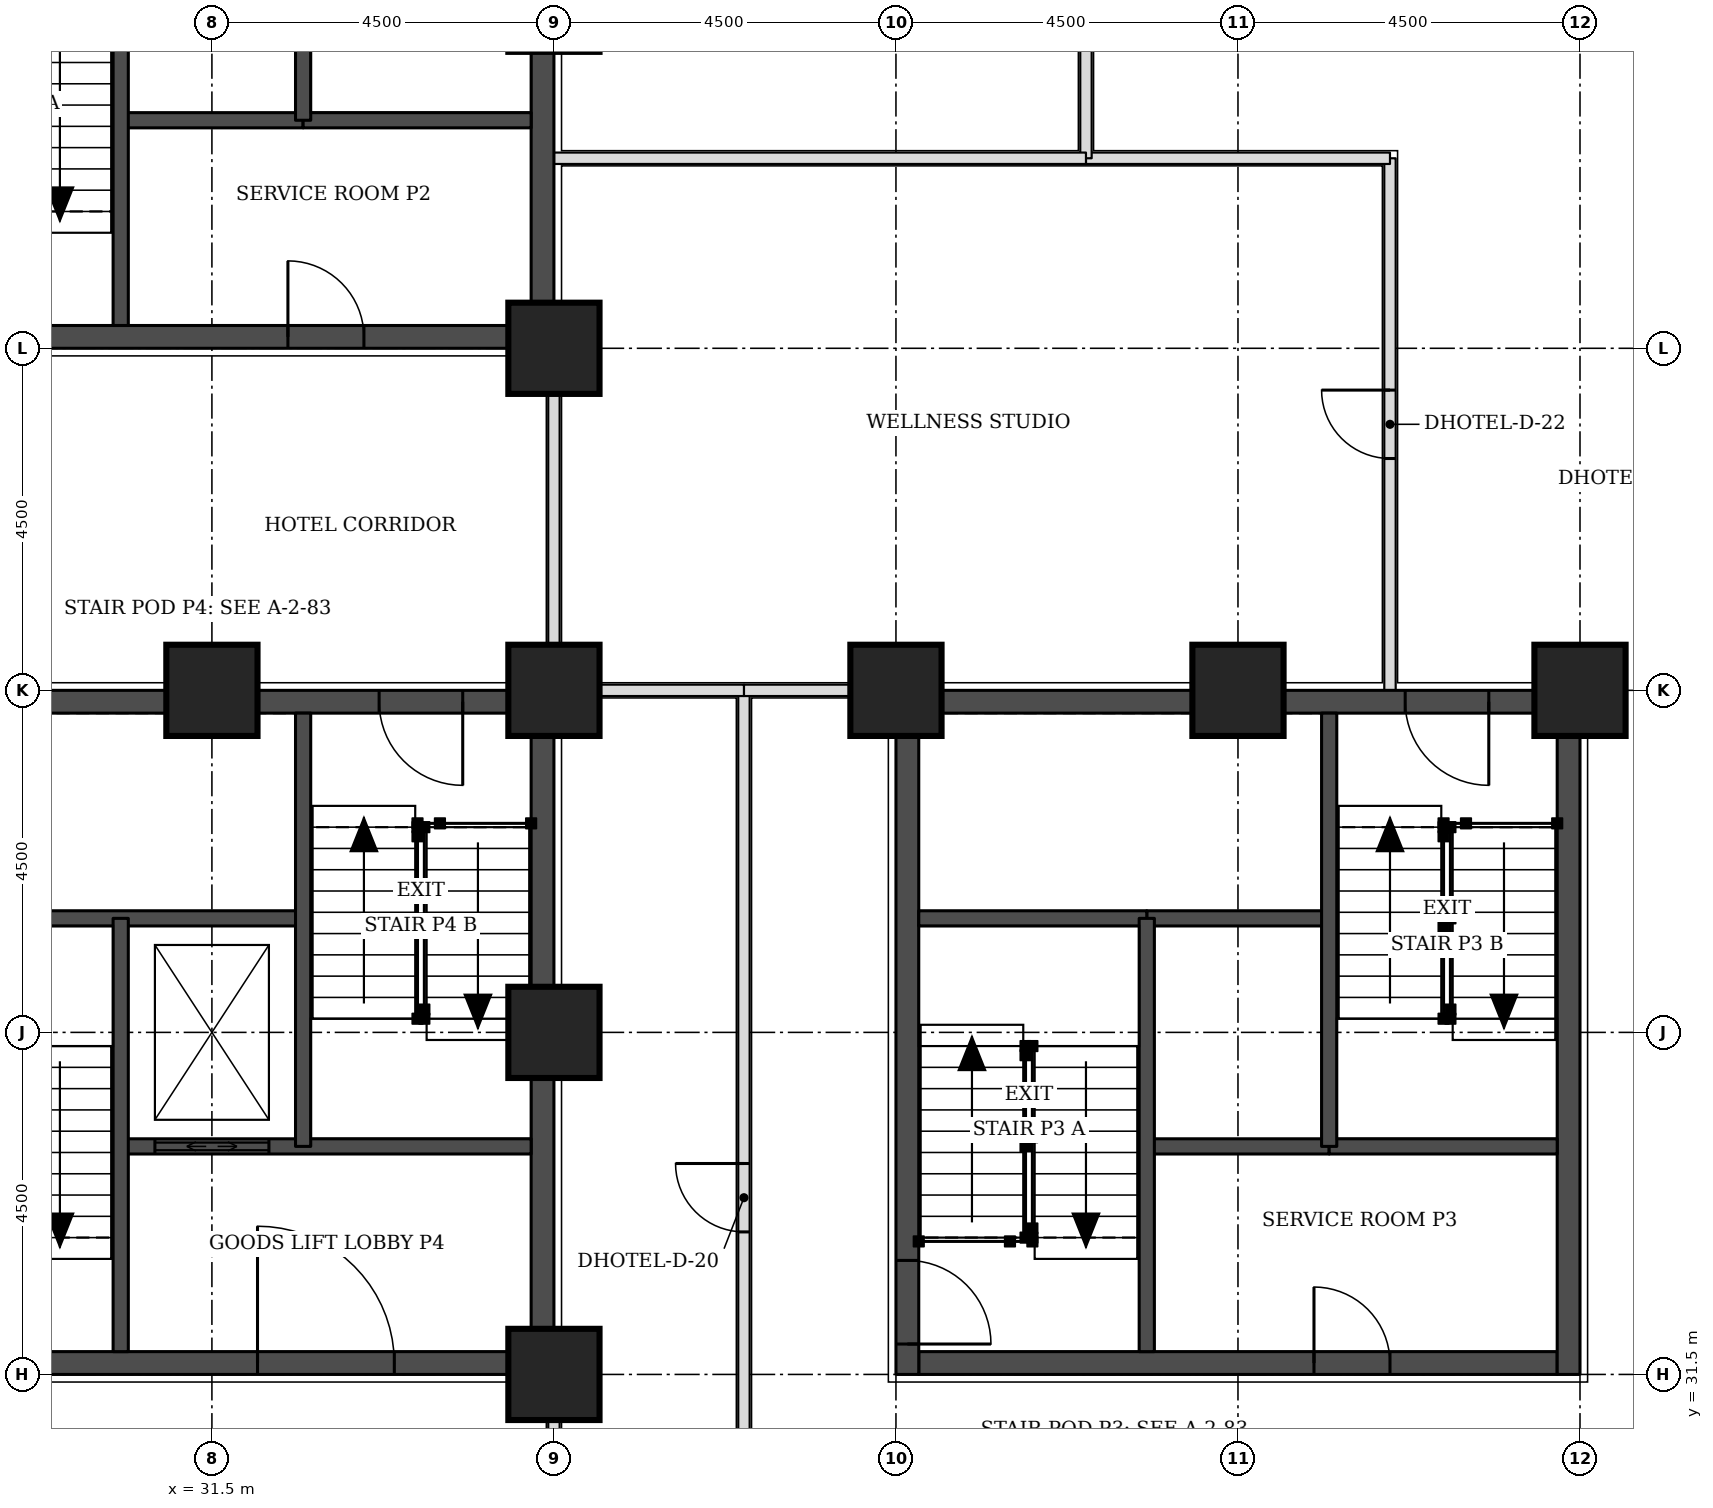
"""IFC4 building model, lengths in metres.
Left out: names, types, materials, properties, quantities, classifications, styles, units other than length and angle.
Written with IfcOpenShell. Run it as: python <this file> out.ifc"""

import sys

from ifc_helpers import new_model, si_unit, direction, frame, frame_2d, origin, origin_2d, place, context, subcontext, project, spatial, rectangle, extrude, element, fill, save


model = new_model("IFC4")
c1 = context("Model", 3, precision=1e-05, world=origin(), true_north=direction((0.0, 1.0)))
c2 = subcontext(c1, "Body", "Model", "MODEL_VIEW")
j1 = project(units=[si_unit("LENGTHUNIT", "METRE"), si_unit("PLANEANGLEUNIT", "RADIAN")], contexts=[c1])
p1 = place(None, origin())
s1 = spatial("IfcSite", under=j1, at=p1, CompositionType="ELEMENT")
p2 = place(p1, origin())
s2 = spatial("IfcBuilding", under=s1, at=p2, CompositionType="ELEMENT")
p3 = place(p2, frame((0.0, 0.0, 59.4)))
s3 = spatial("IfcBuildingStorey", under=s2, at=p3, CompositionType="ELEMENT", Elevation=59.4)
for number, where, z_axis, x_axis in (
    (1, (36.0, 31.5, 0.0), (0.0, 0.0, 1.0), (1.0, 0.0, 0.0)),
    (2, (36.0, 36.0, 0.0), (0.0, 0.0, 1.0), (1.0, 0.0, 0.0)),
    (3, (31.5, 40.5, 0.0), (0.0, 0.0, 1.0), (1.0, 0.0, 0.0)),
    (4, (36.0, 40.5, 0.0), (0.0, 0.0, 1.0), (1.0, 0.0, 0.0)),
    (5, (40.5, 40.5, 0.0), (0.0, 0.0, 1.0), (1.0, 0.0, 0.0)),
    (6, (45.0, 40.5, 0.0), (0.0, 0.0, 1.0), (1.0, 0.0, 0.0)),
    (7, (49.5, 40.5, 0.0), (0.0, 0.0, 1.0), (1.0, 0.0, 0.0)),
    (8, (36.0, 45.0, 0.0), (0.0, 0.0, 1.0), (1.0, 0.0, 0.0)),
):
    element("IfcColumn", number, at=place(p3, frame(where, z_axis=z_axis, x_axis=x_axis)), inside=s3, PredefinedType="COLUMN", context=c2, shape_type="SweptSolid", body=[
        extrude(rectangle(XDim=1.2, YDim=1.2, at=origin_2d()), origin(), (0.0, 0.0, 1.0), 3.3),
    ])
p4 = place(p3, frame((27.3, 45.15, 0.0), z_axis=(0.0, 0.0, 1.0), x_axis=(1.0, 0.0, 0.0)))
e9 = element("IfcWall", 9, at=p4, inside=s3, PredefinedType="SHEAR", context=c2, shape_type="SweptSolid", body=[
    extrude(rectangle(XDim=8.4, YDim=0.3, at=frame_2d((4.2, 0.0))), origin(), (0.0, 0.0, 1.0), 3.3),
])
p5 = place(p4, frame((5.2, 0.0, 0.0)))
e10 = element("IfcOpeningElement", 10, at=p5, cuts=e9, PredefinedType="OPENING", context=c2, shape_type="SweptSolid", body=[
    extrude(rectangle(XDim=1.0, YDim=2.1, at=frame_2d((0.5, 1.05))), frame((0.0, 0.16, 0.0), z_axis=(0.0, -1.0, 0.0), x_axis=(1.0, 0.0, 0.0)), (0.0, 0.0, 1.0), 0.32),
])
p6 = place(p3, frame((35.85, 45.0, 0.0), z_axis=(0.0, 0.0, 1.0), x_axis=(0.0, 1.0, 0.0)))
e11 = element("IfcWall", 11, at=p6, inside=s3, PredefinedType="SHEAR", context=c2, shape_type="SweptSolid", body=[
    extrude(rectangle(XDim=9.0, YDim=0.3, at=frame_2d((4.5, 0.0))), origin(), (0.0, 0.0, 1.0), 3.3),
])
p7 = place(p3, frame((40.8, 31.65, 0.0), z_axis=(0.0, 0.0, 1.0), x_axis=(1.0, 0.0, 0.0)))
e12 = element("IfcWall", 12, at=p7, inside=s3, PredefinedType="SHEAR", context=c2, shape_type="SweptSolid", body=[
    extrude(rectangle(XDim=8.4, YDim=0.3, at=frame_2d((4.2, 0.0))), origin(), (0.0, 0.0, 1.0), 3.3),
])
p8 = place(p7, frame((5.2, 0.0, 0.0)))
e13 = element("IfcOpeningElement", 13, at=p8, cuts=e12, PredefinedType="OPENING", context=c2, shape_type="SweptSolid", body=[
    extrude(rectangle(XDim=1.0, YDim=2.1, at=frame_2d((0.5, 1.05))), frame((0.0, 0.16, 0.0), z_axis=(0.0, -1.0, 0.0), x_axis=(1.0, 0.0, 0.0)), (0.0, 0.0, 1.0), 0.32),
])
p9 = place(p3, frame((40.8, 40.35, 0.0), z_axis=(0.0, 0.0, 1.0), x_axis=(1.0, 0.0, 0.0)))
e14 = element("IfcWall", 14, at=p9, inside=s3, PredefinedType="SHEAR", context=c2, shape_type="SweptSolid", body=[
    extrude(rectangle(XDim=8.4, YDim=0.3, at=frame_2d((4.2, 0.0))), origin(), (0.0, 0.0, 1.0), 3.3),
])
p10 = place(p9, frame((6.4, 0.0, 0.0)))
e15 = element("IfcOpeningElement", 15, at=p10, cuts=e14, PredefinedType="OPENING", context=c2, shape_type="SweptSolid", body=[
    extrude(rectangle(XDim=1.1, YDim=2.1, at=frame_2d((0.55, 1.05))), frame((0.0, 0.16, 0.0), z_axis=(0.0, -1.0, 0.0), x_axis=(1.0, 0.0, 0.0)), (0.0, 0.0, 1.0), 0.32),
])
p11 = place(p3, frame((40.65, 31.5, 0.0), z_axis=(0.0, 0.0, 1.0), x_axis=(0.0, 1.0, 0.0)))
e16 = element("IfcWall", 16, at=p11, inside=s3, PredefinedType="SHEAR", context=c2, shape_type="SweptSolid", body=[
    extrude(rectangle(XDim=9.0, YDim=0.3, at=frame_2d((4.5, 0.0))), origin(), (0.0, 0.0, 1.0), 3.3),
])
p12 = place(p11, frame((0.4, 0.0, 0.0)))
e17 = element("IfcOpeningElement", 17, at=p12, cuts=e16, PredefinedType="OPENING", context=c2, shape_type="SweptSolid", body=[
    extrude(rectangle(XDim=1.1, YDim=2.1, at=frame_2d((0.55, 1.05))), frame((0.0, 0.16, 0.0), z_axis=(0.0, -1.0, 0.0), x_axis=(1.0, 0.0, 0.0)), (0.0, 0.0, 1.0), 0.32),
])
p13 = place(p3, frame((49.35, 31.5, 0.0), z_axis=(0.0, 0.0, 1.0), x_axis=(0.0, 1.0, 0.0)))
e18 = element("IfcWall", 18, at=p13, inside=s3, PredefinedType="SHEAR", context=c2, shape_type="SweptSolid", body=[
    extrude(rectangle(XDim=9.0, YDim=0.3, at=frame_2d((4.5, 0.0))), origin(), (0.0, 0.0, 1.0), 3.3),
])
p14 = place(p3, frame((27.3, 31.65, 0.0), z_axis=(0.0, 0.0, 1.0), x_axis=(1.0, 0.0, 0.0)))
e19 = element("IfcWall", 19, at=p14, inside=s3, PredefinedType="SHEAR", context=c2, shape_type="SweptSolid", body=[
    extrude(rectangle(XDim=8.4, YDim=0.3, at=frame_2d((4.2, 0.0))), origin(), (0.0, 0.0, 1.0), 3.3),
])
p15 = place(p14, frame((4.8, 0.0, 0.0)))
e20 = element("IfcOpeningElement", 20, at=p15, cuts=e19, PredefinedType="OPENING", context=c2, shape_type="SweptSolid", body=[
    extrude(rectangle(XDim=1.8, YDim=2.1, at=frame_2d((0.9, 1.05))), frame((0.0, 0.16, 0.0), z_axis=(0.0, -1.0, 0.0), x_axis=(1.0, 0.0, 0.0)), (0.0, 0.0, 1.0), 0.32),
])
p16 = place(p3, frame((27.3, 40.35, 0.0), z_axis=(0.0, 0.0, 1.0), x_axis=(1.0, 0.0, 0.0)))
e21 = element("IfcWall", 21, at=p16, inside=s3, PredefinedType="SHEAR", context=c2, shape_type="SweptSolid", body=[
    extrude(rectangle(XDim=8.4, YDim=0.3, at=frame_2d((4.2, 0.0))), origin(), (0.0, 0.0, 1.0), 3.3),
])
p17 = place(p16, frame((6.4, 0.0, 0.0)))
e22 = element("IfcOpeningElement", 22, at=p17, cuts=e21, PredefinedType="OPENING", context=c2, shape_type="SweptSolid", body=[
    extrude(rectangle(XDim=1.1, YDim=2.1, at=frame_2d((0.55, 1.05))), frame((0.0, 0.16, 0.0), z_axis=(0.0, -1.0, 0.0), x_axis=(1.0, 0.0, 0.0)), (0.0, 0.0, 1.0), 0.32),
])
p18 = place(p3, frame((35.85, 31.5, 0.0), z_axis=(0.0, 0.0, 1.0), x_axis=(0.0, 1.0, 0.0)))
e23 = element("IfcWall", 23, at=p18, inside=s3, PredefinedType="SHEAR", context=c2, shape_type="SweptSolid", body=[
    extrude(rectangle(XDim=9.0, YDim=0.3, at=frame_2d((4.5, 0.0))), origin(), (0.0, 0.0, 1.0), 3.3),
])
p19 = place(p3, frame((38.5, 27.15, 0.0), z_axis=(0.0, 0.0, 1.0), x_axis=(0.0, 1.0, 0.0)))
e24 = element("IfcWall", 24, at=p19, inside=s3, PredefinedType="PARTITIONING", context=c2, shape_type="SweptSolid", body=[
    extrude(rectangle(XDim=13.35, YDim=0.15, at=frame_2d((6.675, 0.0))), origin(), (0.0, 0.0, 1.0), 3.08),
])
p20 = place(p19, frame((6.225, 0.0, 0.0)))
e25 = element("IfcOpeningElement", 25, at=p20, cuts=e24, PredefinedType="OPENING", context=c2, shape_type="SweptSolid", body=[
    extrude(rectangle(XDim=0.9, YDim=2.1, at=frame_2d((0.45, 1.05))), frame((0.0, 0.085, 0.0), z_axis=(0.0, -1.0, 0.0), x_axis=(1.0, 0.0, 0.0)), (0.0, 0.0, 1.0), 0.17),
])
for number, where, z_axis, x_axis in (
    (26, (36.0, 29.5, 0.0), (0.0, 0.0, 1.0), (0.0, 1.0, 0.0)),
    (27, (38.5, 40.5, 0.0), (0.0, 0.0, 1.0), (1.0, 0.0, 0.0)),
):
    element("IfcWall", number, at=place(p3, frame(where, z_axis=z_axis, x_axis=x_axis)), inside=s3, PredefinedType="PARTITIONING", context=c2, shape_type="SweptSolid", body=[
        extrude(rectangle(XDim=1.95, YDim=0.15, at=frame_2d((0.975, 0.0))), origin(), (0.0, 0.0, 1.0), 2.33),
    ])
p21 = place(p3, frame((36.0, 40.55, 0.0), z_axis=(0.0, 0.0, 1.0), x_axis=(0.0, 1.0, 0.0)))
e28 = element("IfcWall", 28, at=p21, inside=s3, PredefinedType="PARTITIONING", context=c2, shape_type="SweptSolid", body=[
    extrude(rectangle(XDim=4.4, YDim=0.15, at=frame_2d((2.2, 0.0))), origin(), (0.0, 0.0, 1.0), 2.33),
])
p22 = place(p3, frame((47.0, 40.5, 0.0), z_axis=(0.0, 0.0, 1.0), x_axis=(0.0, 1.0, 0.0)))
e29 = element("IfcWall", 29, at=p22, inside=s3, PredefinedType="PARTITIONING", context=c2, shape_type="SweptSolid", body=[
    extrude(rectangle(XDim=7.0, YDim=0.15, at=frame_2d((3.5, 0.0))), origin(), (0.0, 0.0, 1.0), 3.08),
])
p23 = place(p22, frame((3.05, 0.0, 0.0)))
e30 = element("IfcOpeningElement", 30, at=p23, cuts=e29, PredefinedType="OPENING", context=c2, shape_type="SweptSolid", body=[
    extrude(rectangle(XDim=0.9, YDim=2.1, at=frame_2d((0.45, 1.05))), frame((0.0, 0.085, 0.0), z_axis=(0.0, -1.0, 0.0), x_axis=(1.0, 0.0, 0.0)), (0.0, 0.0, 1.0), 0.17),
])
p24 = place(p3, frame((43.0, 47.5, 0.0), z_axis=(0.0, 0.0, 1.0), x_axis=(1.0, 0.0, 0.0)))
e31 = element("IfcWall", 31, at=p24, inside=s3, PredefinedType="PARTITIONING", context=c2, shape_type="SweptSolid", body=[
    extrude(rectangle(XDim=4.0, YDim=0.15, at=frame_2d((2.0, 0.0))), origin(), (0.0, 0.0, 1.0), 3.08),
])
p25 = place(p3, frame((43.0, 47.5, 0.0), z_axis=(0.0, 0.0, 1.0), x_axis=(0.0, 1.0, 0.0)))
e32 = element("IfcWall", 32, at=p25, inside=s3, PredefinedType="PARTITIONING", context=c2, shape_type="SweptSolid", body=[
    extrude(rectangle(XDim=7.85, YDim=0.15, at=frame_2d((3.925, 0.0))), origin(), (0.0, 0.0, 1.0), 3.08),
])
p26 = place(p25, frame((3.475, 0.0, 0.0)))
e33 = element("IfcOpeningElement", 33, at=p26, cuts=e32, PredefinedType="OPENING", context=c2, shape_type="SweptSolid", body=[
    extrude(rectangle(XDim=0.9, YDim=2.1, at=frame_2d((0.45, 1.05))), frame((0.0, 0.085, 0.0), z_axis=(0.0, -1.0, 0.0), x_axis=(1.0, 0.0, 0.0)), (0.0, 0.0, 1.0), 0.17),
])
p27 = place(p3, frame((36.05, 40.5, 0.0), z_axis=(0.0, 0.0, 1.0), x_axis=(1.0, 0.0, 0.0)))
e34 = element("IfcWall", 34, at=p27, inside=s3, PredefinedType="PARTITIONING", context=c2, shape_type="SweptSolid", body=[
    extrude(rectangle(XDim=2.45, YDim=0.15, at=frame_2d((1.225, 0.0))), origin(), (0.0, 0.0, 1.0), 2.33),
])
p28 = place(p3, frame((36.0, 47.5, 0.0), z_axis=(0.0, 0.0, 1.0), x_axis=(1.0, 0.0, 0.0)))
e35 = element("IfcWall", 35, at=p28, inside=s3, PredefinedType="PARTITIONING", context=c2, shape_type="SweptSolid", body=[
    extrude(rectangle(XDim=7.0, YDim=0.15, at=frame_2d((3.5, 0.0))), origin(), (0.0, 0.0, 1.0), 3.08),
])
p29 = place(p3, frame((30.3, 48.0, 0.0), z_axis=(0.0, 0.0, 1.0), x_axis=(1.0, 0.0, 0.0)))
e36 = element("IfcWall", 36, at=p29, inside=s3, PredefinedType="SOLIDWALL", context=c2, shape_type="SweptSolid", body=[
    extrude(rectangle(XDim=2.4, YDim=0.2, at=frame_2d((1.2, 0.0))), origin(), (0.0, 0.0, 1.0), 3.08),
])
p30 = place(p3, frame((32.7, 48.0, 0.0), z_axis=(0.0, 0.0, 1.0), x_axis=(1.0, 0.0, 0.0)))
e37 = element("IfcWall", 37, at=p30, inside=s3, PredefinedType="SOLIDWALL", context=c2, shape_type="SweptSolid", body=[
    extrude(rectangle(XDim=3.0, YDim=0.2, at=frame_2d((1.5, 0.0))), origin(), (0.0, 0.0, 1.0), 3.08),
])
for number, where, z_axis, x_axis in (
    (38, (30.3, 45.3, 0.0), (0.0, 0.0, 1.0), (0.0, 1.0, 0.0)),
    (39, (32.7, 48.0, 0.0), (0.0, 0.0, 1.0), (0.0, 1.0, 0.0)),
):
    element("IfcWall", number, at=place(p3, frame(where, z_axis=z_axis, x_axis=x_axis)), inside=s3, PredefinedType="SOLIDWALL", context=c2, shape_type="SweptSolid", body=[
        extrude(rectangle(XDim=5.7, YDim=0.2, at=frame_2d((2.85, 0.0))), origin(), (0.0, 0.0, 1.0), 3.08),
    ])
p31 = place(p3, frame((43.8, 34.5, 0.0), z_axis=(0.0, 0.0, 1.0), x_axis=(1.0, 0.0, 0.0)))
e40 = element("IfcWall", 40, at=p31, inside=s3, PredefinedType="SOLIDWALL", context=c2, shape_type="SweptSolid", body=[
    extrude(rectangle(XDim=2.4, YDim=0.2, at=frame_2d((1.2, 0.0))), origin(), (0.0, 0.0, 1.0), 3.08),
])
p32 = place(p3, frame((46.2, 34.5, 0.0), z_axis=(0.0, 0.0, 1.0), x_axis=(1.0, 0.0, 0.0)))
e41 = element("IfcWall", 41, at=p32, inside=s3, PredefinedType="SOLIDWALL", context=c2, shape_type="SweptSolid", body=[
    extrude(rectangle(XDim=3.0, YDim=0.2, at=frame_2d((1.5, 0.0))), origin(), (0.0, 0.0, 1.0), 3.08),
])
p33 = place(p3, frame((43.8, 37.5, 0.0), z_axis=(0.0, 0.0, 1.0), x_axis=(1.0, 0.0, 0.0)))
e42 = element("IfcWall", 42, at=p33, inside=s3, PredefinedType="SOLIDWALL", context=c2, shape_type="SweptSolid", body=[
    extrude(rectangle(XDim=2.4, YDim=0.2, at=frame_2d((1.2, 0.0))), origin(), (0.0, 0.0, 1.0), 3.3),
])
p34 = place(p3, frame((40.8, 37.5, 0.0), z_axis=(0.0, 0.0, 1.0), x_axis=(1.0, 0.0, 0.0)))
e43 = element("IfcWall", 43, at=p34, inside=s3, PredefinedType="SOLIDWALL", context=c2, shape_type="SweptSolid", body=[
    extrude(rectangle(XDim=3.0, YDim=0.2, at=frame_2d((1.5, 0.0))), origin(), (0.0, 0.0, 1.0), 3.08),
])
for number, where, z_axis, x_axis in (
    (44, (43.8, 31.8, 0.0), (0.0, 0.0, 1.0), (0.0, 1.0, 0.0)),
    (45, (46.2, 34.5, 0.0), (0.0, 0.0, 1.0), (0.0, 1.0, 0.0)),
):
    element("IfcWall", number, at=place(p3, frame(where, z_axis=z_axis, x_axis=x_axis)), inside=s3, PredefinedType="SOLIDWALL", context=c2, shape_type="SweptSolid", body=[
        extrude(rectangle(XDim=5.7, YDim=0.2, at=frame_2d((2.85, 0.0))), origin(), (0.0, 0.0, 1.0), 3.08),
    ])
p35 = place(p3, frame((30.3, 34.5, 0.0), z_axis=(0.0, 0.0, 1.0), x_axis=(1.0, 0.0, 0.0)))
e46 = element("IfcWall", 46, at=p35, inside=s3, PredefinedType="SOLIDWALL", context=c2, shape_type="SweptSolid", body=[
    extrude(rectangle(XDim=5.4, YDim=0.2, at=frame_2d((2.7, 0.0))), origin(), (0.0, 0.0, 1.0), 3.08),
])
p36 = place(p35, frame((0.45, 0.0, 0.0)))
e47 = element("IfcOpeningElement", 47, at=p36, cuts=e46, PredefinedType="OPENING", context=c2, shape_type="SweptSolid", body=[
    extrude(rectangle(XDim=1.5, YDim=2.1, at=frame_2d((0.75, 1.05))), frame((0.0, 0.11, 0.0), z_axis=(0.0, -1.0, 0.0), x_axis=(1.0, 0.0, 0.0)), (0.0, 0.0, 1.0), 0.22),
])
p37 = place(p3, frame((27.3, 37.5, 0.0), z_axis=(0.0, 0.0, 1.0), x_axis=(1.0, 0.0, 0.0)))
e48 = element("IfcWall", 48, at=p37, inside=s3, PredefinedType="SOLIDWALL", context=c2, shape_type="SweptSolid", body=[
    extrude(rectangle(XDim=5.4, YDim=0.2, at=frame_2d((2.7, 0.0))), origin(), (0.0, 0.0, 1.0), 3.08),
])
for number, where, z_axis, x_axis in (
    (49, (30.3, 31.8, 0.0), (0.0, 0.0, 1.0), (0.0, 1.0, 0.0)),
    (50, (32.7, 34.5, 0.0), (0.0, 0.0, 1.0), (0.0, 1.0, 0.0)),
):
    element("IfcWall", number, at=place(p3, frame(where, z_axis=z_axis, x_axis=x_axis)), inside=s3, PredefinedType="SOLIDWALL", context=c2, shape_type="SweptSolid", body=[
        extrude(rectangle(XDim=5.7, YDim=0.2, at=frame_2d((2.85, 0.0))), origin(), (0.0, 0.0, 1.0), 3.08),
    ])
p38 = place(p20, origin())
e51 = element("IfcDoor", 51, at=p38, inside=s3, OperationType="SINGLE_SWING_RIGHT", PredefinedType="DOOR", context=c2, shape_type="SweptSolid", body=[
    extrude(rectangle(XDim=0.9, YDim=2.1, at=frame_2d((0.45, 1.05))), frame((0.0, 0.025, 0.0), z_axis=(0.0, -1.0, 0.0), x_axis=(1.0, 0.0, 0.0)), (0.0, 0.0, 1.0), 0.05),
])
fill(e25, e51)
p39 = place(p23, origin())
e52 = element("IfcDoor", 52, at=p39, inside=s3, OperationType="SINGLE_SWING_RIGHT", PredefinedType="DOOR", context=c2, shape_type="SweptSolid", body=[
    extrude(rectangle(XDim=0.9, YDim=2.1, at=frame_2d((0.45, 1.05))), frame((0.0, 0.025, 0.0), z_axis=(0.0, -1.0, 0.0), x_axis=(1.0, 0.0, 0.0)), (0.0, 0.0, 1.0), 0.05),
])
fill(e30, e52)
p40 = place(p5, origin())
e53 = element("IfcDoor", 53, at=p40, inside=s3, OperationType="SINGLE_SWING_LEFT", PredefinedType="DOOR", context=c2, shape_type="SweptSolid", body=[
    extrude(rectangle(XDim=1.0, YDim=2.1, at=frame_2d((0.5, 1.05))), frame((0.0, 0.025, 0.0), z_axis=(0.0, -1.0, 0.0), x_axis=(1.0, 0.0, 0.0)), (0.0, 0.0, 1.0), 0.05),
])
fill(e10, e53)
p41 = place(p12, frame((1.1, 0.0, 0.0), z_axis=(0.0, 0.0, 1.0), x_axis=(-1.0, 0.0, 0.0)))
e54 = element("IfcDoor", 54, at=p41, inside=s3, OperationType="SINGLE_SWING_RIGHT", PredefinedType="DOOR", context=c2, shape_type="SweptSolid", body=[
    extrude(rectangle(XDim=1.1, YDim=2.1, at=frame_2d((0.55, 1.05))), frame((0.0, 0.025, 0.0), z_axis=(0.0, -1.0, 0.0), x_axis=(1.0, 0.0, 0.0)), (0.0, 0.0, 1.0), 0.05),
])
fill(e17, e54)
p42 = place(p10, frame((1.1, 0.0, 0.0), z_axis=(0.0, 0.0, 1.0), x_axis=(-1.0, 0.0, 0.0)))
e55 = element("IfcDoor", 55, at=p42, inside=s3, OperationType="SINGLE_SWING_LEFT", PredefinedType="DOOR", context=c2, shape_type="SweptSolid", body=[
    extrude(rectangle(XDim=1.1, YDim=2.1, at=frame_2d((0.55, 1.05))), frame((0.0, 0.025, 0.0), z_axis=(0.0, -1.0, 0.0), x_axis=(1.0, 0.0, 0.0)), (0.0, 0.0, 1.0), 0.05),
])
fill(e15, e55)
p43 = place(p8, origin())
e56 = element("IfcDoor", 56, at=p43, inside=s3, OperationType="SINGLE_SWING_LEFT", PredefinedType="DOOR", context=c2, shape_type="SweptSolid", body=[
    extrude(rectangle(XDim=1.0, YDim=2.1, at=frame_2d((0.5, 1.05))), frame((0.0, 0.025, 0.0), z_axis=(0.0, -1.0, 0.0), x_axis=(1.0, 0.0, 0.0)), (0.0, 0.0, 1.0), 0.05),
])
fill(e13, e56)
p44 = place(p17, frame((1.1, 0.0, 0.0), z_axis=(0.0, 0.0, 1.0), x_axis=(-1.0, 0.0, 0.0)))
e57 = element("IfcDoor", 57, at=p44, inside=s3, OperationType="SINGLE_SWING_LEFT", PredefinedType="DOOR", context=c2, shape_type="SweptSolid", body=[
    extrude(rectangle(XDim=1.1, YDim=2.1, at=frame_2d((0.55, 1.05))), frame((0.0, 0.025, 0.0), z_axis=(0.0, -1.0, 0.0), x_axis=(1.0, 0.0, 0.0)), (0.0, 0.0, 1.0), 0.05),
])
fill(e22, e57)
p45 = place(p36, origin())
e58 = element("IfcDoor", 58, at=p45, inside=s3, OperationType="DOUBLE_DOOR_SLIDING", PredefinedType="DOOR", context=c2, shape_type="SweptSolid", body=[
    extrude(rectangle(XDim=1.5, YDim=2.1, at=frame_2d((0.75, 1.05))), frame((0.0, 0.025, 0.0), z_axis=(0.0, -1.0, 0.0), x_axis=(1.0, 0.0, 0.0)), (0.0, 0.0, 1.0), 0.05),
])
fill(e47, e58)
p46 = place(p15, origin())
e59 = element("IfcDoor", 59, at=p46, inside=s3, OperationType="SINGLE_SWING_LEFT", PredefinedType="DOOR", context=c2, shape_type="SweptSolid", body=[
    extrude(rectangle(XDim=1.8, YDim=2.1, at=frame_2d((0.9, 1.05))), frame((0.0, 0.025, 0.0), z_axis=(0.0, -1.0, 0.0), x_axis=(1.0, 0.0, 0.0)), (0.0, 0.0, 1.0), 0.05),
])
fill(e20, e59)
save(model, sys.argv[1])
